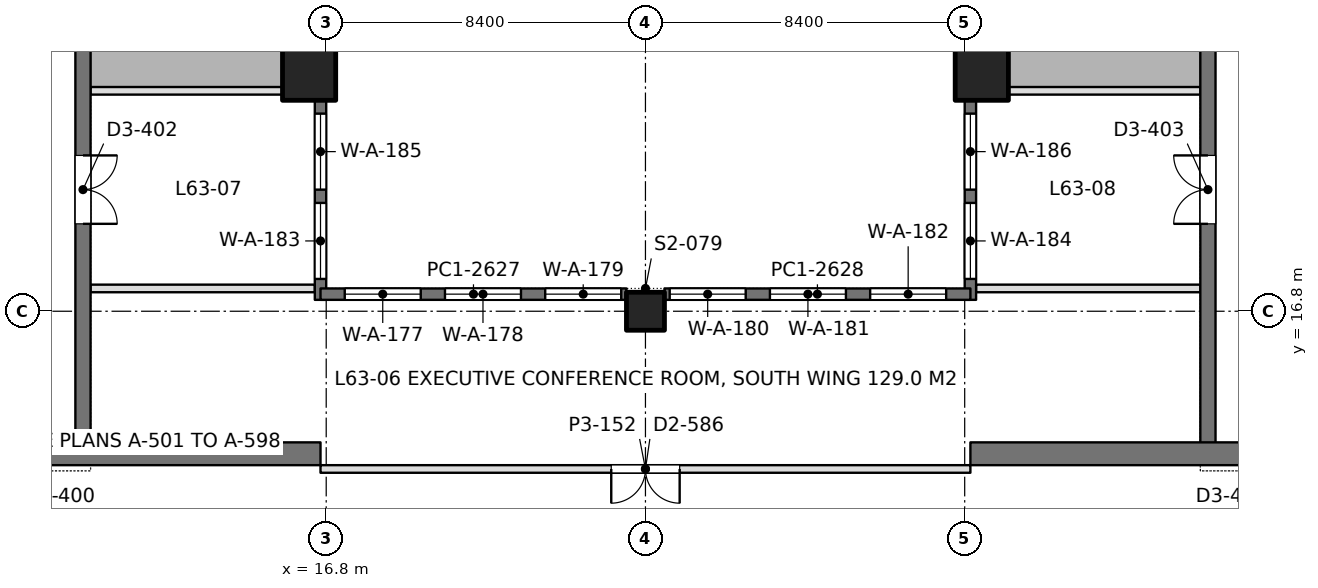
"""IFC4 building model, lengths in metres.
Left out: names, types, materials, properties, quantities, classifications, styles, units other than length and angle.
Written with IfcOpenShell. Run it as: python <this file> out.ifc"""

import sys

from ifc_helpers import new_model, si_unit, direction, frame, frame_2d, origin, origin_2d, place, context, subcontext, project, spatial, rectangle, extrude, element, fill, save


model = new_model("IFC4")
c1 = context("Model", 3, precision=1e-05, world=origin(), true_north=direction((0.0, 1.0)))
c2 = subcontext(c1, "Body", "Model", "MODEL_VIEW")
j1 = project(units=[si_unit("LENGTHUNIT", "METRE"), si_unit("PLANEANGLEUNIT", "RADIAN")], contexts=[c1])
p1 = place(None, origin())
s1 = spatial("IfcSite", under=j1, at=p1, CompositionType="ELEMENT")
p2 = place(p1, origin())
s2 = spatial("IfcBuilding", under=s1, at=p2, CompositionType="ELEMENT")
p3 = place(p2, frame((0.0, 0.0, 277.2)))
s3 = spatial("IfcBuildingStorey", under=s2, at=p3, CompositionType="ELEMENT", Elevation=277.2)
p4 = place(p3, frame((25.2, 16.8, 0.0), z_axis=(0.0, 0.0, 1.0), x_axis=(1.0, 0.0, 0.0)))
e1 = element("IfcColumn", 1, at=p4, inside=s3, PredefinedType="COLUMN", context=c2, shape_type="SweptSolid", body=[
    extrude(rectangle(XDim=1.0, YDim=1.0, at=origin_2d()), origin(), (0.0, 0.0, 1.0), 4.5),
])
for number, where, z_axis, x_axis in (
    (2, (16.35, 23.05, 0.0), (0.0, 0.0, 1.0), (1.0, 0.0, 0.0)),
    (3, (34.05, 23.05, 0.0), (0.0, 0.0, 1.0), (1.0, 0.0, 0.0)),
):
    element("IfcColumn", number, at=place(p3, frame(where, z_axis=z_axis, x_axis=x_axis)), inside=s3, PredefinedType="COLUMN", context=c2, shape_type="SweptSolid", body=[
        extrude(rectangle(XDim=1.4, YDim=1.4, at=origin_2d()), origin(), (0.0, 0.0, 1.0), 4.5),
    ])
p5 = place(p3, frame((-1.05, 13.05, 0.0), z_axis=(0.0, 0.0, 1.0), x_axis=(1.0, 0.0, 0.0)))
e4 = element("IfcWall", 4, at=p5, inside=s3, PredefinedType="SHEAR", context=c2, shape_type="SweptSolid", body=[
    extrude(rectangle(XDim=17.7, YDim=0.6, at=frame_2d((8.85, 0.0))), origin(), (0.0, 0.0, 1.0), 4.5),
])
p6 = place(p5, frame((8.8, 0.0, 0.0)))
e5 = element("IfcOpeningElement", 5, at=p6, cuts=e4, PredefinedType="OPENING", context=c2, shape_type="SweptSolid", body=[
    extrude(rectangle(XDim=1.8, YDim=2.4, at=frame_2d((0.9, 1.2))), frame((0.0, 0.31, 0.0), z_axis=(0.0, -1.0, 0.0), x_axis=(1.0, 0.0, 0.0)), (0.0, 0.0, 1.0), 0.62),
])
p7 = place(p3, frame((10.4, 13.05, 0.0), z_axis=(0.0, 0.0, 1.0), x_axis=(0.0, 1.0, 0.0)))
e6 = element("IfcWall", 6, at=p7, inside=s3, PredefinedType="SHEAR", context=c2, shape_type="SweptSolid", body=[
    extrude(rectangle(XDim=24.3, YDim=0.4, at=frame_2d((12.15, 0.0))), origin(), (0.0, 0.0, 1.0), 4.5),
])
p8 = place(p7, frame((15.75, 0.0, 0.0)))
e7 = element("IfcOpeningElement", 7, at=p8, cuts=e6, PredefinedType="OPENING", context=c2, shape_type="SweptSolid", body=[
    extrude(rectangle(XDim=1.1, YDim=2.2, at=frame_2d((0.55, 1.1))), frame((0.0, 0.21, 0.0), z_axis=(0.0, -1.0, 0.0), x_axis=(1.0, 0.0, 0.0)), (0.0, 0.0, 1.0), 0.42),
])
p9 = place(p7, frame((18.6, 0.0, 0.0)))
e8 = element("IfcOpeningElement", 8, at=p9, cuts=e6, PredefinedType="OPENING", context=c2, shape_type="SweptSolid", body=[
    extrude(rectangle(XDim=1.1, YDim=2.2, at=frame_2d((0.55, 1.1))), frame((0.0, 0.21, 0.0), z_axis=(0.0, -1.0, 0.0), x_axis=(1.0, 0.0, 0.0)), (0.0, 0.0, 1.0), 0.42),
])
p10 = place(p7, frame((21.45, 0.0, 0.0)))
e9 = element("IfcOpeningElement", 9, at=p10, cuts=e6, PredefinedType="OPENING", context=c2, shape_type="SweptSolid", body=[
    extrude(rectangle(XDim=1.1, YDim=2.2, at=frame_2d((0.55, 1.1))), frame((0.0, 0.21, 0.0), z_axis=(0.0, -1.0, 0.0), x_axis=(1.0, 0.0, 0.0)), (0.0, 0.0, 1.0), 0.42),
])
p11 = place(p7, frame((6.05, 0.0, 0.0)))
e10 = element("IfcOpeningElement", 10, at=p11, cuts=e6, PredefinedType="OPENING", context=c2, shape_type="SweptSolid", body=[
    extrude(rectangle(XDim=1.8, YDim=2.4, at=frame_2d((0.9, 1.2))), frame((0.0, 0.21, 0.0), z_axis=(0.0, -1.0, 0.0), x_axis=(1.0, 0.0, 0.0)), (0.0, 0.0, 1.0), 0.42),
])
p12 = place(p7, frame((11.25, 0.0, 0.0)))
e11 = element("IfcOpeningElement", 11, at=p12, cuts=e6, PredefinedType="OPENING", context=c2, shape_type="SweptSolid", body=[
    extrude(rectangle(XDim=1.8, YDim=2.4, at=frame_2d((0.9, 1.2))), frame((0.0, 0.21, 0.0), z_axis=(0.0, -1.0, 0.0), x_axis=(1.0, 0.0, 0.0)), (0.0, 0.0, 1.0), 0.42),
])
p13 = place(p3, frame((33.75, 13.05, 0.0), z_axis=(0.0, 0.0, 1.0), x_axis=(1.0, 0.0, 0.0)))
e12 = element("IfcWall", 12, at=p13, inside=s3, PredefinedType="SHEAR", context=c2, shape_type="SweptSolid", body=[
    extrude(rectangle(XDim=17.7, YDim=0.6, at=frame_2d((8.85, 0.0))), origin(), (0.0, 0.0, 1.0), 4.5),
])
p14 = place(p13, frame((7.1, 0.0, 0.0)))
e13 = element("IfcOpeningElement", 13, at=p14, cuts=e12, PredefinedType="OPENING", context=c2, shape_type="SweptSolid", body=[
    extrude(rectangle(XDim=1.8, YDim=2.4, at=frame_2d((0.9, 1.2))), frame((0.0, 0.31, 0.0), z_axis=(0.0, -1.0, 0.0), x_axis=(1.0, 0.0, 0.0)), (0.0, 0.0, 1.0), 0.62),
])
p15 = place(p3, frame((40.0, 13.05, 0.0), z_axis=(0.0, 0.0, 1.0), x_axis=(0.0, 1.0, 0.0)))
e14 = element("IfcWall", 14, at=p15, inside=s3, PredefinedType="SHEAR", context=c2, shape_type="SweptSolid", body=[
    extrude(rectangle(XDim=24.3, YDim=0.4, at=frame_2d((12.15, 0.0))), origin(), (0.0, 0.0, 1.0), 4.5),
])
p16 = place(p15, frame((15.75, 0.0, 0.0)))
e15 = element("IfcOpeningElement", 15, at=p16, cuts=e14, PredefinedType="OPENING", context=c2, shape_type="SweptSolid", body=[
    extrude(rectangle(XDim=1.1, YDim=2.2, at=frame_2d((0.55, 1.1))), frame((0.0, 0.21, 0.0), z_axis=(0.0, -1.0, 0.0), x_axis=(1.0, 0.0, 0.0)), (0.0, 0.0, 1.0), 0.42),
])
p17 = place(p15, frame((18.6, 0.0, 0.0)))
e16 = element("IfcOpeningElement", 16, at=p17, cuts=e14, PredefinedType="OPENING", context=c2, shape_type="SweptSolid", body=[
    extrude(rectangle(XDim=1.1, YDim=2.2, at=frame_2d((0.55, 1.1))), frame((0.0, 0.21, 0.0), z_axis=(0.0, -1.0, 0.0), x_axis=(1.0, 0.0, 0.0)), (0.0, 0.0, 1.0), 0.42),
])
p18 = place(p15, frame((21.45, 0.0, 0.0)))
e17 = element("IfcOpeningElement", 17, at=p18, cuts=e14, PredefinedType="OPENING", context=c2, shape_type="SweptSolid", body=[
    extrude(rectangle(XDim=1.1, YDim=2.2, at=frame_2d((0.55, 1.1))), frame((0.0, 0.21, 0.0), z_axis=(0.0, -1.0, 0.0), x_axis=(1.0, 0.0, 0.0)), (0.0, 0.0, 1.0), 0.42),
])
p19 = place(p15, frame((6.05, 0.0, 0.0)))
e18 = element("IfcOpeningElement", 18, at=p19, cuts=e14, PredefinedType="OPENING", context=c2, shape_type="SweptSolid", body=[
    extrude(rectangle(XDim=1.8, YDim=2.4, at=frame_2d((0.9, 1.2))), frame((0.0, 0.21, 0.0), z_axis=(0.0, -1.0, 0.0), x_axis=(1.0, 0.0, 0.0)), (0.0, 0.0, 1.0), 0.42),
])
p20 = place(p15, frame((11.25, 0.0, 0.0)))
e19 = element("IfcOpeningElement", 19, at=p20, cuts=e14, PredefinedType="OPENING", context=c2, shape_type="SweptSolid", body=[
    extrude(rectangle(XDim=1.8, YDim=2.4, at=frame_2d((0.9, 1.2))), frame((0.0, 0.21, 0.0), z_axis=(0.0, -1.0, 0.0), x_axis=(1.0, 0.0, 0.0)), (0.0, 0.0, 1.0), 0.42),
])
p21 = place(p3, frame((16.65, 17.1, 0.0), z_axis=(0.0, 0.0, 1.0), x_axis=(0.0, 1.0, 0.0)))
e20 = element("IfcWall", 20, at=p21, inside=s3, PredefinedType="SOLIDWALL", context=c2, shape_type="SweptSolid", body=[
    extrude(rectangle(XDim=10.7, YDim=0.3, at=frame_2d((5.35, 0.0))), origin(), (0.0, 0.0, 1.0), 4.3),
])
p22 = place(p21, frame((0.55, 0.0, 0.1)))
e21 = element("IfcOpeningElement", 21, at=p22, cuts=e20, PredefinedType="OPENING", context=c2, shape_type="SweptSolid", body=[
    extrude(rectangle(XDim=2.0, YDim=3.0, at=frame_2d((1.0, 1.5))), frame((0.0, 0.16, 0.0), z_axis=(0.0, -1.0, 0.0), x_axis=(1.0, 0.0, 0.0)), (0.0, 0.0, 1.0), 0.32),
])
p23 = place(p21, frame((2.9, 0.0, 0.1)))
e22 = element("IfcOpeningElement", 22, at=p23, cuts=e20, PredefinedType="OPENING", context=c2, shape_type="SweptSolid", body=[
    extrude(rectangle(XDim=2.0, YDim=3.0, at=frame_2d((1.0, 1.5))), frame((0.0, 0.16, 0.0), z_axis=(0.0, -1.0, 0.0), x_axis=(1.0, 0.0, 0.0)), (0.0, 0.0, 1.0), 0.32),
])
p24 = place(p21, frame((7.675, 0.0, 0.1)))
e23 = element("IfcOpeningElement", 23, at=p24, cuts=e20, PredefinedType="OPENING", context=c2, shape_type="SweptSolid", body=[
    extrude(rectangle(XDim=2.0, YDim=3.0, at=frame_2d((1.0, 1.5))), frame((0.0, 0.16, 0.0), z_axis=(0.0, -1.0, 0.0), x_axis=(1.0, 0.0, 0.0)), (0.0, 0.0, 1.0), 0.32),
])
p25 = place(p3, frame((33.75, 17.1, 0.0), z_axis=(0.0, 0.0, 1.0), x_axis=(0.0, 1.0, 0.0)))
e24 = element("IfcWall", 24, at=p25, inside=s3, PredefinedType="SOLIDWALL", context=c2, shape_type="SweptSolid", body=[
    extrude(rectangle(XDim=10.7, YDim=0.3, at=frame_2d((5.35, 0.0))), origin(), (0.0, 0.0, 1.0), 4.3),
])
p26 = place(p25, frame((0.55, 0.0, 0.1)))
e25 = element("IfcOpeningElement", 25, at=p26, cuts=e24, PredefinedType="OPENING", context=c2, shape_type="SweptSolid", body=[
    extrude(rectangle(XDim=2.0, YDim=3.0, at=frame_2d((1.0, 1.5))), frame((0.0, 0.16, 0.0), z_axis=(0.0, -1.0, 0.0), x_axis=(1.0, 0.0, 0.0)), (0.0, 0.0, 1.0), 0.32),
])
p27 = place(p25, frame((2.9, 0.0, 0.1)))
e26 = element("IfcOpeningElement", 26, at=p27, cuts=e24, PredefinedType="OPENING", context=c2, shape_type="SweptSolid", body=[
    extrude(rectangle(XDim=2.0, YDim=3.0, at=frame_2d((1.0, 1.5))), frame((0.0, 0.16, 0.0), z_axis=(0.0, -1.0, 0.0), x_axis=(1.0, 0.0, 0.0)), (0.0, 0.0, 1.0), 0.32),
])
p28 = place(p25, frame((7.675, 0.0, 0.1)))
e27 = element("IfcOpeningElement", 27, at=p28, cuts=e24, PredefinedType="OPENING", context=c2, shape_type="SweptSolid", body=[
    extrude(rectangle(XDim=2.0, YDim=3.0, at=frame_2d((1.0, 1.5))), frame((0.0, 0.16, 0.0), z_axis=(0.0, -1.0, 0.0), x_axis=(1.0, 0.0, 0.0)), (0.0, 0.0, 1.0), 0.32),
])
p29 = place(p3, frame((16.65, 17.25, 0.0), z_axis=(0.0, 0.0, 1.0), x_axis=(1.0, 0.0, 0.0)))
e28 = element("IfcWall", 28, at=p29, inside=s3, PredefinedType="SOLIDWALL", context=c2, shape_type="SweptSolid", body=[
    extrude(rectangle(XDim=8.05, YDim=0.3, at=frame_2d((4.025, 0.0))), origin(), (0.0, 0.0, 1.0), 4.3),
])
p30 = place(p29, frame((0.637, 0.0, 0.1)))
e29 = element("IfcOpeningElement", 29, at=p30, cuts=e28, PredefinedType="OPENING", context=c2, shape_type="SweptSolid", body=[
    extrude(rectangle(XDim=2.0, YDim=3.0, at=frame_2d((1.0, 1.5))), frame((0.0, 0.16, 0.0), z_axis=(0.0, -1.0, 0.0), x_axis=(1.0, 0.0, 0.0)), (0.0, 0.0, 1.0), 0.32),
])
p31 = place(p29, frame((3.275, 0.0, 0.1)))
e30 = element("IfcOpeningElement", 30, at=p31, cuts=e28, PredefinedType="OPENING", context=c2, shape_type="SweptSolid", body=[
    extrude(rectangle(XDim=2.0, YDim=3.0, at=frame_2d((1.0, 1.5))), frame((0.0, 0.16, 0.0), z_axis=(0.0, -1.0, 0.0), x_axis=(1.0, 0.0, 0.0)), (0.0, 0.0, 1.0), 0.32),
])
p32 = place(p29, frame((5.913, 0.0, 0.1)))
e31 = element("IfcOpeningElement", 31, at=p32, cuts=e28, PredefinedType="OPENING", context=c2, shape_type="SweptSolid", body=[
    extrude(rectangle(XDim=2.0, YDim=3.0, at=frame_2d((1.0, 1.5))), frame((0.0, 0.16, 0.0), z_axis=(0.0, -1.0, 0.0), x_axis=(1.0, 0.0, 0.0)), (0.0, 0.0, 1.0), 0.32),
])
p33 = place(p3, frame((25.7, 17.25, 0.0), z_axis=(0.0, 0.0, 1.0), x_axis=(1.0, 0.0, 0.0)))
e32 = element("IfcWall", 32, at=p33, inside=s3, PredefinedType="SOLIDWALL", context=c2, shape_type="SweptSolid", body=[
    extrude(rectangle(XDim=8.05, YDim=0.3, at=frame_2d((4.025, 0.0))), origin(), (0.0, 0.0, 1.0), 4.3),
])
p34 = place(p33, frame((0.137, 0.0, 0.1)))
e33 = element("IfcOpeningElement", 33, at=p34, cuts=e32, PredefinedType="OPENING", context=c2, shape_type="SweptSolid", body=[
    extrude(rectangle(XDim=2.0, YDim=3.0, at=frame_2d((1.0, 1.5))), frame((0.0, 0.16, 0.0), z_axis=(0.0, -1.0, 0.0), x_axis=(1.0, 0.0, 0.0)), (0.0, 0.0, 1.0), 0.32),
])
p35 = place(p33, frame((2.775, 0.0, 0.1)))
e34 = element("IfcOpeningElement", 34, at=p35, cuts=e32, PredefinedType="OPENING", context=c2, shape_type="SweptSolid", body=[
    extrude(rectangle(XDim=2.0, YDim=3.0, at=frame_2d((1.0, 1.5))), frame((0.0, 0.16, 0.0), z_axis=(0.0, -1.0, 0.0), x_axis=(1.0, 0.0, 0.0)), (0.0, 0.0, 1.0), 0.32),
])
p36 = place(p33, frame((5.413, 0.0, 0.1)))
e35 = element("IfcOpeningElement", 35, at=p36, cuts=e32, PredefinedType="OPENING", context=c2, shape_type="SweptSolid", body=[
    extrude(rectangle(XDim=2.0, YDim=3.0, at=frame_2d((1.0, 1.5))), frame((0.0, 0.16, 0.0), z_axis=(0.0, -1.0, 0.0), x_axis=(1.0, 0.0, 0.0)), (0.0, 0.0, 1.0), 0.32),
])
p37 = place(p3, frame((10.598, 17.4, 0.0), z_axis=(0.0, 0.0, 1.0), x_axis=(1.0, 0.0, 0.0)))
e36 = element("IfcWall", 36, at=p37, inside=s3, PredefinedType="PARTITIONING", context=c2, shape_type="SweptSolid", body=[
    extrude(rectangle(XDim=5.904, YDim=0.2, at=frame_2d((2.952, 0.0))), origin(), (0.0, 0.0, 1.0), 3.292),
])
p38 = place(p3, frame((10.598, 22.6, 0.0), z_axis=(0.0, 0.0, 1.0), x_axis=(1.0, 0.0, 0.0)))
e37 = element("IfcWall", 37, at=p38, inside=s3, PredefinedType="PARTITIONING", context=c2, shape_type="SweptSolid", body=[
    extrude(rectangle(XDim=5.053, YDim=0.2, at=frame_2d((2.526, 0.0))), origin(), (0.0, 0.0, 1.0), 4.3),
])
p39 = place(p3, frame((33.898, 17.4, 0.0), z_axis=(0.0, 0.0, 1.0), x_axis=(1.0, 0.0, 0.0)))
e38 = element("IfcWall", 38, at=p39, inside=s3, PredefinedType="PARTITIONING", context=c2, shape_type="SweptSolid", body=[
    extrude(rectangle(XDim=5.904, YDim=0.2, at=frame_2d((2.952, 0.0))), origin(), (0.0, 0.0, 1.0), 3.292),
])
p40 = place(p3, frame((34.749, 22.6, 0.0), z_axis=(0.0, 0.0, 1.0), x_axis=(1.0, 0.0, 0.0)))
e39 = element("IfcWall", 39, at=p40, inside=s3, PredefinedType="PARTITIONING", context=c2, shape_type="SweptSolid", body=[
    extrude(rectangle(XDim=5.053, YDim=0.2, at=frame_2d((2.526, 0.0))), origin(), (0.0, 0.0, 1.0), 4.3),
])
p41 = place(p3, frame((16.65, 12.65, 0.0), z_axis=(0.0, 0.0, 1.0), x_axis=(1.0, 0.0, 0.0)))
e40 = element("IfcWall", 40, at=p41, inside=s3, PredefinedType="PARTITIONING", context=c2, shape_type="SweptSolid", body=[
    extrude(rectangle(XDim=17.1, YDim=0.2, at=frame_2d((8.55, 0.0))), origin(), (0.0, 0.0, 1.0), 3.182),
])
p42 = place(p41, frame((7.65, 0.0, 0.0)))
e41 = element("IfcOpeningElement", 41, at=p42, cuts=e40, PredefinedType="OPENING", context=c2, shape_type="SweptSolid", body=[
    extrude(rectangle(XDim=1.8, YDim=2.2, at=frame_2d((0.9, 1.1))), frame((0.0, 0.11, 0.0), z_axis=(0.0, -1.0, 0.0), x_axis=(1.0, 0.0, 0.0)), (0.0, 0.0, 1.0), 0.22),
])
p43 = place(p22, origin())
e42 = element("IfcWindow", 42, at=p43, inside=s3, PartitioningType="SINGLE_PANEL", PredefinedType="WINDOW", context=c2, shape_type="SweptSolid", body=[
    extrude(rectangle(XDim=2.0, YDim=3.0, at=frame_2d((1.0, 1.5))), frame((0.0, 0.03, 0.0), z_axis=(0.0, -1.0, 0.0), x_axis=(1.0, 0.0, 0.0)), (0.0, 0.0, 1.0), 0.06),
])
fill(e21, e42)
p44 = place(p23, origin())
e43 = element("IfcWindow", 43, at=p44, inside=s3, PartitioningType="SINGLE_PANEL", PredefinedType="WINDOW", context=c2, shape_type="SweptSolid", body=[
    extrude(rectangle(XDim=2.0, YDim=3.0, at=frame_2d((1.0, 1.5))), frame((0.0, 0.03, 0.0), z_axis=(0.0, -1.0, 0.0), x_axis=(1.0, 0.0, 0.0)), (0.0, 0.0, 1.0), 0.06),
])
fill(e22, e43)
p45 = place(p26, origin())
e44 = element("IfcWindow", 44, at=p45, inside=s3, PartitioningType="SINGLE_PANEL", PredefinedType="WINDOW", context=c2, shape_type="SweptSolid", body=[
    extrude(rectangle(XDim=2.0, YDim=3.0, at=frame_2d((1.0, 1.5))), frame((0.0, 0.03, 0.0), z_axis=(0.0, -1.0, 0.0), x_axis=(1.0, 0.0, 0.0)), (0.0, 0.0, 1.0), 0.06),
])
fill(e25, e44)
p46 = place(p27, origin())
e45 = element("IfcWindow", 45, at=p46, inside=s3, PartitioningType="SINGLE_PANEL", PredefinedType="WINDOW", context=c2, shape_type="SweptSolid", body=[
    extrude(rectangle(XDim=2.0, YDim=3.0, at=frame_2d((1.0, 1.5))), frame((0.0, 0.03, 0.0), z_axis=(0.0, -1.0, 0.0), x_axis=(1.0, 0.0, 0.0)), (0.0, 0.0, 1.0), 0.06),
])
fill(e26, e45)
p47 = place(p30, origin())
e46 = element("IfcWindow", 46, at=p47, inside=s3, PartitioningType="SINGLE_PANEL", PredefinedType="WINDOW", context=c2, shape_type="SweptSolid", body=[
    extrude(rectangle(XDim=2.0, YDim=3.0, at=frame_2d((1.0, 1.5))), frame((0.0, 0.03, 0.0), z_axis=(0.0, -1.0, 0.0), x_axis=(1.0, 0.0, 0.0)), (0.0, 0.0, 1.0), 0.06),
])
fill(e29, e46)
p48 = place(p31, origin())
e47 = element("IfcWindow", 47, at=p48, inside=s3, PartitioningType="SINGLE_PANEL", PredefinedType="WINDOW", context=c2, shape_type="SweptSolid", body=[
    extrude(rectangle(XDim=2.0, YDim=3.0, at=frame_2d((1.0, 1.5))), frame((0.0, 0.03, 0.0), z_axis=(0.0, -1.0, 0.0), x_axis=(1.0, 0.0, 0.0)), (0.0, 0.0, 1.0), 0.06),
])
fill(e30, e47)
p49 = place(p32, origin())
e48 = element("IfcWindow", 48, at=p49, inside=s3, PartitioningType="SINGLE_PANEL", PredefinedType="WINDOW", context=c2, shape_type="SweptSolid", body=[
    extrude(rectangle(XDim=2.0, YDim=3.0, at=frame_2d((1.0, 1.5))), frame((0.0, 0.03, 0.0), z_axis=(0.0, -1.0, 0.0), x_axis=(1.0, 0.0, 0.0)), (0.0, 0.0, 1.0), 0.06),
])
fill(e31, e48)
p50 = place(p34, origin())
e49 = element("IfcWindow", 49, at=p50, inside=s3, PartitioningType="SINGLE_PANEL", PredefinedType="WINDOW", context=c2, shape_type="SweptSolid", body=[
    extrude(rectangle(XDim=2.0, YDim=3.0, at=frame_2d((1.0, 1.5))), frame((0.0, 0.03, 0.0), z_axis=(0.0, -1.0, 0.0), x_axis=(1.0, 0.0, 0.0)), (0.0, 0.0, 1.0), 0.06),
])
fill(e33, e49)
p51 = place(p35, origin())
e50 = element("IfcWindow", 50, at=p51, inside=s3, PartitioningType="SINGLE_PANEL", PredefinedType="WINDOW", context=c2, shape_type="SweptSolid", body=[
    extrude(rectangle(XDim=2.0, YDim=3.0, at=frame_2d((1.0, 1.5))), frame((0.0, 0.03, 0.0), z_axis=(0.0, -1.0, 0.0), x_axis=(1.0, 0.0, 0.0)), (0.0, 0.0, 1.0), 0.06),
])
fill(e34, e50)
p52 = place(p36, origin())
e51 = element("IfcWindow", 51, at=p52, inside=s3, PartitioningType="SINGLE_PANEL", PredefinedType="WINDOW", context=c2, shape_type="SweptSolid", body=[
    extrude(rectangle(XDim=2.0, YDim=3.0, at=frame_2d((1.0, 1.5))), frame((0.0, 0.03, 0.0), z_axis=(0.0, -1.0, 0.0), x_axis=(1.0, 0.0, 0.0)), (0.0, 0.0, 1.0), 0.06),
])
fill(e35, e51)
p53 = place(p11, frame((1.8, 0.0, 0.0), z_axis=(0.0, 0.0, 1.0), x_axis=(-1.0, 0.0, 0.0)))
e52 = element("IfcDoor", 52, at=p53, inside=s3, OperationType="DOUBLE_DOOR_SINGLE_SWING", PredefinedType="DOOR", context=c2, shape_type="SweptSolid", body=[
    extrude(rectangle(XDim=1.8, YDim=2.4, at=frame_2d((0.9, 1.2))), frame((0.0, 0.025, 0.0), z_axis=(0.0, -1.0, 0.0), x_axis=(1.0, 0.0, 0.0)), (0.0, 0.0, 1.0), 0.05),
])
fill(e10, e52)
p54 = place(p19, origin())
e53 = element("IfcDoor", 53, at=p54, inside=s3, OperationType="DOUBLE_DOOR_SINGLE_SWING", PredefinedType="DOOR", context=c2, shape_type="SweptSolid", body=[
    extrude(rectangle(XDim=1.8, YDim=2.4, at=frame_2d((0.9, 1.2))), frame((0.0, 0.025, 0.0), z_axis=(0.0, -1.0, 0.0), x_axis=(1.0, 0.0, 0.0)), (0.0, 0.0, 1.0), 0.05),
])
fill(e18, e53)
p55 = place(p42, frame((1.8, 0.0, 0.0), z_axis=(0.0, 0.0, 1.0), x_axis=(-1.0, 0.0, 0.0)))
e54 = element("IfcDoor", 54, at=p55, inside=s3, OperationType="DOUBLE_DOOR_SINGLE_SWING", PredefinedType="DOOR", context=c2, shape_type="SweptSolid", body=[
    extrude(rectangle(XDim=1.8, YDim=2.2, at=frame_2d((0.9, 1.1))), frame((0.0, 0.025, 0.0), z_axis=(0.0, -1.0, 0.0), x_axis=(1.0, 0.0, 0.0)), (0.0, 0.0, 1.0), 0.05),
])
fill(e41, e54)
save(model, sys.argv[1])
